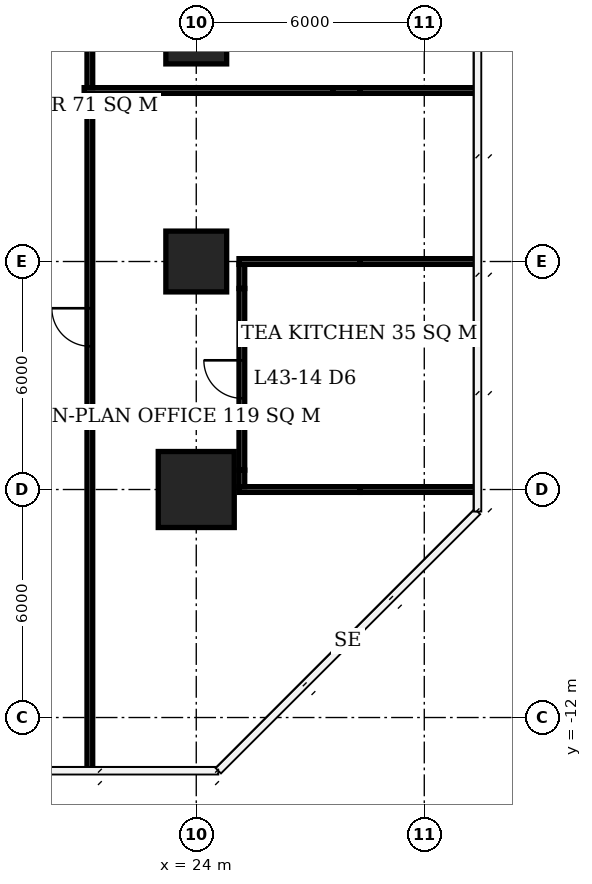
"""IFC4 building model, lengths in metres.
Left out: names, types, materials, properties, quantities, classifications, styles, units other than length and angle.
Written with IfcOpenShell. Run it as: python <this file> out.ifc"""

import sys

from ifc_helpers import new_model, si_unit, direction, frame, frame_2d, origin, origin_2d, place, context, subcontext, project, spatial, rectangle, extrude, element, fill, save


model = new_model("IFC4")
c1 = context("Model", 3, precision=1e-05, world=origin(), true_north=direction((0.0, 1.0)))
c2 = subcontext(c1, "Body", "Model", "MODEL_VIEW")
j1 = project(units=[si_unit("LENGTHUNIT", "METRE"), si_unit("PLANEANGLEUNIT", "RADIAN")], contexts=[c1])
p1 = place(None, origin())
s1 = spatial("IfcSite", under=j1, at=p1, CompositionType="ELEMENT")
p2 = place(p1, origin())
s2 = spatial("IfcBuilding", under=s1, at=p2, CompositionType="ELEMENT")
p3 = place(p2, frame((0.0, 0.0, 177.2)))
s3 = spatial("IfcBuildingStorey", under=s2, at=p3, CompositionType="ELEMENT", Elevation=177.2)
p4 = place(p3, frame((24.0, -6.0, 0.0), z_axis=(0.0, 0.0, 1.0), x_axis=(1.0, 0.0, 0.0)))
e1 = element("IfcColumn", 1, at=p4, inside=s3, PredefinedType="COLUMN", context=c2, shape_type="SweptSolid", body=[
    extrude(rectangle(XDim=2.0, YDim=2.0, at=origin_2d()), origin(), (0.0, 0.0, 1.0), 3.9),
])
for number, where, z_axis, x_axis in (
    (2, (24.0, 0.0, 0.0), (0.0, 0.0, 1.0), (1.0, 0.0, 0.0)),
    (3, (24.0, 6.0, 0.0), (0.0, 0.0, 1.0), (1.0, 0.0, 0.0)),
):
    element("IfcColumn", number, at=place(p3, frame(where, z_axis=z_axis, x_axis=x_axis)), inside=s3, PredefinedType="COLUMN", context=c2, shape_type="SweptSolid", body=[
        extrude(rectangle(XDim=1.6, YDim=1.6, at=origin_2d()), origin(), (0.0, 0.0, 1.0), 3.9),
    ])
p5 = place(p3, frame((25.125, -6.0, 0.0), z_axis=(0.0, 0.0, 1.0), x_axis=(1.0, 0.0, 0.0)))
e4 = element("IfcWall", 4, at=p5, inside=s3, PredefinedType="PARTITIONING", context=c2, shape_type="SweptSolid", body=[
    extrude(rectangle(XDim=3.185, YDim=0.15, at=frame_2d((1.593, 0.0))), origin(), (0.0, 0.0, 1.0), 2.65),
])
p6 = place(p3, frame((28.31, -6.0, 0.0), z_axis=(0.0, 0.0, 1.0), x_axis=(1.0, 0.0, 0.0)))
e5 = element("IfcWall", 5, at=p6, inside=s3, PredefinedType="PARTITIONING", context=c2, shape_type="SweptSolid", body=[
    extrude(rectangle(XDim=3.09, YDim=0.15, at=frame_2d((1.545, 0.0))), origin(), (0.0, 0.0, 1.0), 3.65),
])
p7 = place(p3, frame((25.125, 0.0, 0.0), z_axis=(0.0, 0.0, 1.0), x_axis=(1.0, 0.0, 0.0)))
e6 = element("IfcWall", 6, at=p7, inside=s3, PredefinedType="PARTITIONING", context=c2, shape_type="SweptSolid", body=[
    extrude(rectangle(XDim=3.185, YDim=0.15, at=frame_2d((1.593, 0.0))), origin(), (0.0, 0.0, 1.0), 2.65),
])
p8 = place(p3, frame((28.31, 0.0, 0.0), z_axis=(0.0, 0.0, 1.0), x_axis=(1.0, 0.0, 0.0)))
e7 = element("IfcWall", 7, at=p8, inside=s3, PredefinedType="PARTITIONING", context=c2, shape_type="SweptSolid", body=[
    extrude(rectangle(XDim=3.09, YDim=0.15, at=frame_2d((1.545, 0.0))), origin(), (0.0, 0.0, 1.0), 3.65),
])
p9 = place(p3, frame((25.2, -5.925, 0.0), z_axis=(0.0, 0.0, 1.0), x_axis=(0.0, 1.0, 0.0)))
e8 = element("IfcWall", 8, at=p9, inside=s3, PredefinedType="PARTITIONING", context=c2, shape_type="SweptSolid", body=[
    extrude(rectangle(XDim=0.435, YDim=0.15, at=frame_2d((0.218, 0.0))), origin(), (0.0, 0.0, 1.0), 2.65),
])
p10 = place(p3, frame((25.2, -5.49, 0.0), z_axis=(0.0, 0.0, 1.0), x_axis=(0.0, 1.0, 0.0)))
e9 = element("IfcWall", 9, at=p10, inside=s3, PredefinedType="PARTITIONING", context=c2, shape_type="SweptSolid", body=[
    extrude(rectangle(XDim=4.78, YDim=0.15, at=frame_2d((2.39, 0.0))), origin(), (0.0, 0.0, 1.0), 3.65),
])
p11 = place(p10, frame((1.89, 0.0, 0.0)))
e10 = element("IfcOpeningElement", 10, at=p11, cuts=e9, PredefinedType="OPENING", context=c2, shape_type="SweptSolid", body=[
    extrude(rectangle(XDim=1.0, YDim=2.1, at=frame_2d((0.5, 1.05))), frame((0.0, 0.085, 0.0), z_axis=(0.0, -1.0, 0.0), x_axis=(1.0, 0.0, 0.0)), (0.0, 0.0, 1.0), 0.17),
])
p12 = place(p3, frame((25.2, -0.71, 0.0), z_axis=(0.0, 0.0, 1.0), x_axis=(0.0, 1.0, 0.0)))
e11 = element("IfcWall", 11, at=p12, inside=s3, PredefinedType="PARTITIONING", context=c2, shape_type="SweptSolid", body=[
    extrude(rectangle(XDim=0.635, YDim=0.15, at=frame_2d((0.317, 0.0))), origin(), (0.0, 0.0, 1.0), 2.65),
])
p13 = place(p3, frame((21.2, -13.4, 0.0), z_axis=(0.0, 0.0, 1.0), x_axis=(0.0, 1.0, 0.0)))
e12 = element("IfcWall", 12, at=p13, inside=s3, PredefinedType="PARTITIONING", context=c2, shape_type="SweptSolid", body=[
    extrude(rectangle(XDim=17.825, YDim=0.15, at=frame_2d((8.913, 0.0))), origin(), (0.0, 0.0, 1.0), 3.65),
])
p14 = place(p13, frame((11.17, 0.0, 0.0)))
e13 = element("IfcOpeningElement", 13, at=p14, cuts=e12, PredefinedType="OPENING", context=c2, shape_type="SweptSolid", body=[
    extrude(rectangle(XDim=1.0, YDim=2.1, at=frame_2d((0.5, 1.05))), frame((0.0, 0.085, 0.0), z_axis=(0.0, -1.0, 0.0), x_axis=(1.0, 0.0, 0.0)), (0.0, 0.0, 1.0), 0.17),
])
p15 = place(p3, frame((21.2, 4.575, 0.0), z_axis=(0.0, 0.0, 1.0), x_axis=(0.0, 1.0, 0.0)))
e14 = element("IfcWall", 14, at=p15, inside=s3, PredefinedType="PARTITIONING", context=c2, shape_type="SweptSolid", body=[
    extrude(rectangle(XDim=14.85, YDim=0.15, at=frame_2d((7.425, 0.0))), origin(), (0.0, 0.0, 1.0), 3.65),
])
p16 = place(p15, frame((9.175, 0.0, 0.0)))
e15 = element("IfcOpeningElement", 15, at=p16, cuts=e14, PredefinedType="OPENING", context=c2, shape_type="SweptSolid", body=[
    extrude(rectangle(XDim=1.0, YDim=2.1, at=frame_2d((0.5, 1.05))), frame((0.0, 0.085, 0.0), z_axis=(0.0, -1.0, 0.0), x_axis=(1.0, 0.0, 0.0)), (0.0, 0.0, 1.0), 0.17),
])
p17 = place(p3, frame((21.05, 4.5, 0.0), z_axis=(0.0, 0.0, 1.0), x_axis=(1.0, 0.0, 0.0)))
e16 = element("IfcWall", 16, at=p17, inside=s3, PredefinedType="PARTITIONING", context=c2, shape_type="SweptSolid", body=[
    extrude(rectangle(XDim=6.54, YDim=0.15, at=frame_2d((3.27, 0.0))), origin(), (0.0, 0.0, 1.0), 3.65),
])
p18 = place(p3, frame((27.59, 4.5, 0.0), z_axis=(0.0, 0.0, 1.0), x_axis=(1.0, 0.0, 0.0)))
e17 = element("IfcWall", 17, at=p18, inside=s3, PredefinedType="PARTITIONING", context=c2, shape_type="SweptSolid", body=[
    extrude(rectangle(XDim=0.72, YDim=0.15, at=frame_2d((0.36, 0.0))), origin(), (0.0, 0.0, 1.0), 2.65),
])
p19 = place(p3, frame((28.31, 4.5, 0.0), z_axis=(0.0, 0.0, 1.0), x_axis=(1.0, 0.0, 0.0)))
e18 = element("IfcWall", 18, at=p19, inside=s3, PredefinedType="PARTITIONING", context=c2, shape_type="SweptSolid", body=[
    extrude(rectangle(XDim=3.09, YDim=0.15, at=frame_2d((1.545, 0.0))), origin(), (0.0, 0.0, 1.0), 3.65),
])
p20 = place(p11, origin())
e19 = element("IfcDoor", 19, at=p20, inside=s3, OperationType="SINGLE_SWING_RIGHT", PredefinedType="DOOR", context=c2, shape_type="SweptSolid", body=[
    extrude(rectangle(XDim=1.0, YDim=2.1, at=frame_2d((0.5, 1.05))), frame((0.0, 0.025, 0.0), z_axis=(0.0, -1.0, 0.0), x_axis=(1.0, 0.0, 0.0)), (0.0, 0.0, 1.0), 0.05),
])
fill(e10, e19)
p21 = place(p14, origin())
e20 = element("IfcDoor", 20, at=p21, inside=s3, OperationType="SINGLE_SWING_RIGHT", PredefinedType="DOOR", context=c2, shape_type="SweptSolid", body=[
    extrude(rectangle(XDim=1.0, YDim=2.1, at=frame_2d((0.5, 1.05))), frame((0.0, 0.025, 0.0), z_axis=(0.0, -1.0, 0.0), x_axis=(1.0, 0.0, 0.0)), (0.0, 0.0, 1.0), 0.05),
])
fill(e13, e20)
save(model, sys.argv[1])
